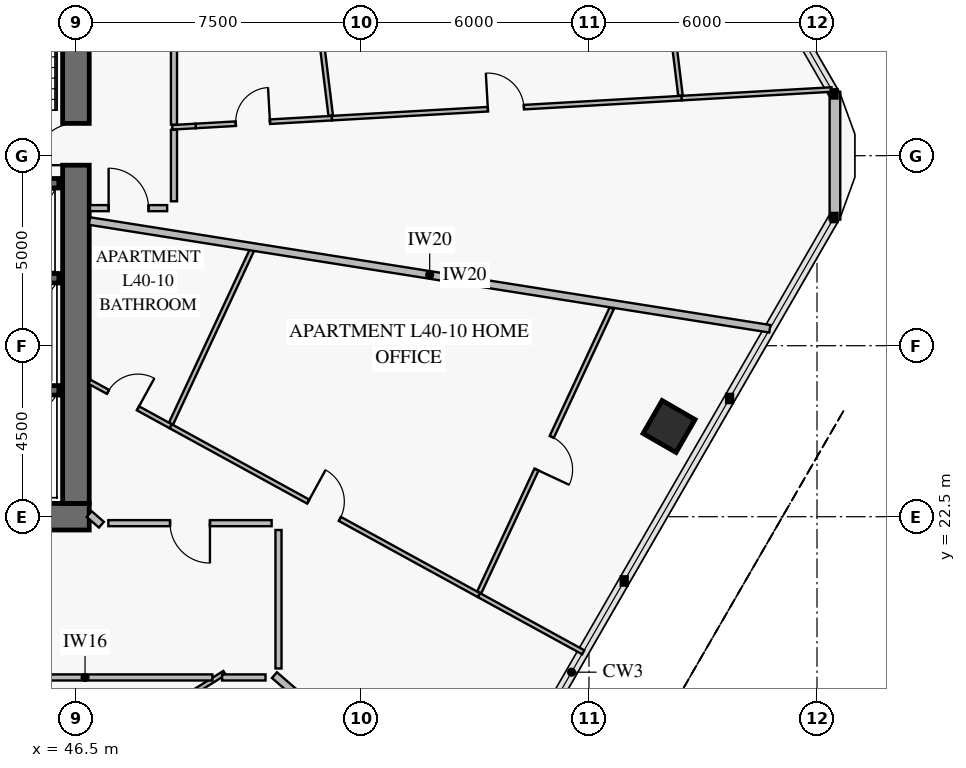
"""IFC4 building model, lengths in metres.
Left out: names, types, materials, properties, quantities, classifications, styles, units other than length and angle.
Written with IfcOpenShell. Run it as: python <this file> out.ifc"""

import sys

from ifc_helpers import new_model, si_unit, direction, frame, frame_2d, origin, origin_2d, place, context, subcontext, project, spatial, rectangle, extrude, element, fill, save


model = new_model("IFC4")
c1 = context("Model", 3, precision=1e-05, world=origin(), true_north=direction((0.0, 1.0)))
c2 = subcontext(c1, "Body", "Model", "MODEL_VIEW")
j1 = project(units=[si_unit("LENGTHUNIT", "METRE"), si_unit("PLANEANGLEUNIT", "RADIAN")], contexts=[c1])
p1 = place(None, origin())
s1 = spatial("IfcSite", under=j1, at=p1, CompositionType="ELEMENT")
p2 = place(p1, origin())
s2 = spatial("IfcBuilding", under=s1, at=p2, CompositionType="ELEMENT")
p3 = place(p2, frame((0.0, 0.0, 161.8)))
s3 = spatial("IfcBuildingStorey", under=s2, at=p3, CompositionType="ELEMENT", Elevation=161.8)
p4 = place(p3, frame((37.35, 22.5, 0.0), z_axis=(0.0, 0.0, 1.0), x_axis=(1.0, 0.0, 0.0)))
e1 = element("IfcWall", 1, at=p4, inside=s3, PredefinedType="SHEAR", context=c2, shape_type="SweptSolid", body=[
    extrude(rectangle(XDim=9.5, YDim=0.7, at=frame_2d((4.75, 0.0))), origin(), (0.0, 0.0, 1.0), 3.8),
])
p5 = place(p4, frame((3.95, 0.0, 0.0)))
e2 = element("IfcOpeningElement", 2, at=p5, cuts=e1, PredefinedType="OPENING", context=c2, shape_type="SweptSolid", body=[
    extrude(rectangle(XDim=1.5, YDim=2.15, at=frame_2d((0.75, 1.075))), frame((0.0, 0.362, 0.0), z_axis=(0.0, -1.0, 0.0), x_axis=(1.0, 0.0, 0.0)), (0.0, 0.0, 1.0), 0.724),
])
p6 = place(p3, frame((46.5, 22.85, 0.0), z_axis=(0.0, 0.0, 1.0), x_axis=(0.0, 1.0, 0.0)))
e3 = element("IfcWall", 3, at=p6, inside=s3, PredefinedType="SHEAR", context=c2, shape_type="SweptSolid", body=[
    extrude(rectangle(XDim=18.3, YDim=0.7, at=frame_2d((9.15, 0.0))), origin(), (0.0, 0.0, 1.0), 3.8),
])
p7 = place(p6, frame((8.9, 0.0, 0.0)))
e4 = element("IfcOpeningElement", 4, at=p7, cuts=e3, PredefinedType="OPENING", context=c2, shape_type="SweptSolid", body=[
    extrude(rectangle(XDim=1.1, YDim=2.15, at=frame_2d((0.55, 1.075))), frame((0.0, 0.362, 0.0), z_axis=(0.0, -1.0, 0.0), x_axis=(1.0, 0.0, 0.0)), (0.0, 0.0, 1.0), 0.724),
])
p8 = place(p3, frame((62.108, 24.874, 0.0), z_axis=(0.0, 0.0, 1.0), x_axis=(0.5, 0.866025403784, 0.0)))
e5 = element("IfcColumn", 5, at=p8, inside=s3, PredefinedType="COLUMN", context=c2, shape_type="SweptSolid", body=[
    extrude(rectangle(XDim=1.0, YDim=1.0, at=origin_2d()), origin(), (0.0, 0.0, 1.0), 3.55),
])
p9 = place(p3, frame((66.472, 33.683, 0.0), z_axis=(0.0, 0.0, 1.0), x_axis=(0.0, -1.0, 0.0)))
e6 = element("IfcWall", 6, at=p9, inside=s3, PredefinedType="SOLIDWALL", context=c2, shape_type="SweptSolid", body=[
    extrude(rectangle(XDim=3.365, YDim=0.28, at=frame_2d((1.683, 0.0))), origin(), (0.0, 0.0, 1.0), 3.55),
])
p10 = place(p3, frame((25.95, 31.275, 0.0), z_axis=(0.0, 0.0, 1.0), x_axis=(1.0, 0.0, 0.0)))
e7 = element("IfcWall", 7, at=p10, inside=s3, PredefinedType="SOLIDWALL", context=c2, shape_type="SweptSolid", body=[
    extrude(rectangle(XDim=20.1, YDim=0.25, at=frame_2d((10.05, 0.0))), origin(), (0.0, 0.0, 1.0), 3.8),
])
p11 = place(p10, frame((2.6, 0.0, 0.0)))
e8 = element("IfcOpeningElement", 8, at=p11, cuts=e7, PredefinedType="OPENING", context=c2, shape_type="SweptSolid", body=[
    extrude(rectangle(XDim=1.1, YDim=2.15, at=frame_2d((0.55, 1.075))), frame((0.0, 0.137, 0.0), z_axis=(0.0, -1.0, 0.0), x_axis=(1.0, 0.0, 0.0)), (0.0, 0.0, 1.0), 0.274),
])
p12 = place(p10, frame((10.6, 0.0, 0.0)))
e9 = element("IfcOpeningElement", 9, at=p12, cuts=e7, PredefinedType="OPENING", context=c2, shape_type="SweptSolid", body=[
    extrude(rectangle(XDim=1.1, YDim=2.15, at=frame_2d((0.55, 1.075))), frame((0.0, 0.137, 0.0), z_axis=(0.0, -1.0, 0.0), x_axis=(1.0, 0.0, 0.0)), (0.0, 0.0, 1.0), 0.274),
])
p13 = place(p10, frame((16.35, 0.0, 0.0)))
e10 = element("IfcOpeningElement", 10, at=p13, cuts=e7, PredefinedType="OPENING", context=c2, shape_type="SweptSolid", body=[
    extrude(rectangle(XDim=1.1, YDim=2.15, at=frame_2d((0.55, 1.075))), frame((0.0, 0.137, 0.0), z_axis=(0.0, -1.0, 0.0), x_axis=(1.0, 0.0, 0.0)), (0.0, 0.0, 1.0), 0.274),
])
for number, where, z_axis, x_axis in (
    (11, (43.8, 25.825, 0.0), (0.0, 0.0, 1.0), (1.0, 0.0, 0.0)),
    (12, (43.8, 28.775, 0.0), (0.0, 0.0, 1.0), (1.0, 0.0, 0.0)),
):
    element("IfcWall", number, at=place(p3, frame(where, z_axis=z_axis, x_axis=x_axis)), inside=s3, PredefinedType="SOLIDWALL", context=c2, shape_type="SweptSolid", body=[
        extrude(rectangle(XDim=2.25, YDim=0.25, at=frame_2d((1.125, 0.0))), origin(), (0.0, 0.0, 1.0), 3.8),
    ])
p14 = place(p3, frame((46.858, 26.051, 0.0), z_axis=(0.0, 0.0, 1.0), x_axis=(0.876994813325, -0.480499841209, 0.0)))
e13 = element("IfcWall", 13, at=p14, inside=s3, PredefinedType="PARTITIONING", context=c2, shape_type="SweptSolid", body=[
    extrude(rectangle(XDim=2.438, YDim=0.12, at=frame_2d((1.219, 0.0))), origin(), (0.0, 0.0, 1.0), 3.55),
])
p15 = place(p14, frame((0.552, 0.0, 0.0)))
e14 = element("IfcOpeningElement", 14, at=p15, cuts=e13, PredefinedType="OPENING", context=c2, shape_type="SweptSolid", body=[
    extrude(rectangle(XDim=0.9, YDim=2.1, at=frame_2d((0.45, 1.05))), frame((0.0, 0.072, 0.0), z_axis=(0.0, -1.0, 0.0), x_axis=(1.0, 0.0, 0.0)), (0.0, 0.0, 1.0), 0.144),
])
p16 = place(p3, frame((48.996, 24.879, 0.0), z_axis=(0.0, 0.0, 1.0), x_axis=(0.876975739836, -0.480534651965, 0.0)))
e15 = element("IfcWall", 15, at=p16, inside=s3, PredefinedType="PARTITIONING", context=c2, shape_type="SweptSolid", body=[
    extrude(rectangle(XDim=9.247, YDim=0.12, at=frame_2d((4.623, 0.0))), origin(), (0.0, 0.0, 1.0), 3.15),
])
p17 = place(p16, frame((4.123, 0.0, 0.0)))
e16 = element("IfcOpeningElement", 16, at=p17, cuts=e15, PredefinedType="OPENING", context=c2, shape_type="SweptSolid", body=[
    extrude(rectangle(XDim=0.95, YDim=2.1, at=frame_2d((0.475, 1.05))), frame((0.0, 0.072, 0.0), z_axis=(0.0, -1.0, 0.0), x_axis=(1.0, 0.0, 0.0)), (0.0, 0.0, 1.0), 0.144),
])
p18 = place(p3, frame((57.112, 20.509, 0.0), z_axis=(0.0, 0.0, 1.0), x_axis=(0.422622958653, 0.906305596815, 0.0)))
e17 = element("IfcWall", 17, at=p18, inside=s3, PredefinedType="PARTITIONING", context=c2, shape_type="SweptSolid", body=[
    extrude(rectangle(XDim=8.249, YDim=0.12, at=frame_2d((4.125, 0.0))), origin(), (0.0, 0.0, 1.0), 2.9),
])
p19 = place(p18, frame((3.565, 0.0, 0.0)))
e18 = element("IfcOpeningElement", 18, at=p19, cuts=e17, PredefinedType="OPENING", context=c2, shape_type="SweptSolid", body=[
    extrude(rectangle(XDim=0.95, YDim=2.1, at=frame_2d((0.475, 1.05))), frame((0.0, 0.072, 0.0), z_axis=(0.0, -1.0, 0.0), x_axis=(1.0, 0.0, 0.0)), (0.0, 0.0, 1.0), 0.144),
])
p20 = place(p3, frame((51.65, 22.33, 0.0), z_axis=(0.0, 0.0, 1.0), x_axis=(-1.0, 0.0, 0.0)))
e19 = element("IfcWall", 19, at=p20, inside=s3, PredefinedType="PARTITIONING", context=c2, shape_type="SweptSolid", body=[
    extrude(rectangle(XDim=4.297, YDim=0.16, at=frame_2d((2.148, 0.0))), origin(), (0.0, 0.0, 1.0), 3.55),
])
p21 = place(p20, frame((1.624, 0.0, 0.0)))
e20 = element("IfcOpeningElement", 20, at=p21, cuts=e19, PredefinedType="OPENING", context=c2, shape_type="SweptSolid", body=[
    extrude(rectangle(XDim=1.05, YDim=2.15, at=frame_2d((0.525, 1.075))), frame((0.0, 0.092, 0.0), z_axis=(0.0, -1.0, 0.0), x_axis=(1.0, 0.0, 0.0)), (0.0, 0.0, 1.0), 0.184),
])
p22 = place(p3, frame((49.65, 32.782, 0.0), z_axis=(0.0, 0.0, 1.0), x_axis=(0.998362032919, 0.057212334562, 0.0)))
e21 = element("IfcWall", 21, at=p22, inside=s3, PredefinedType="PARTITIONING", context=c2, shape_type="SweptSolid", body=[
    extrude(rectangle(XDim=3.593, YDim=0.12, at=frame_2d((1.796, 0.0))), origin(), (0.0, 0.0, 1.0), 3.55),
])
p23 = place(p22, frame((1.059, 0.0, 0.0)))
e22 = element("IfcOpeningElement", 22, at=p23, cuts=e21, PredefinedType="OPENING", context=c2, shape_type="SweptSolid", body=[
    extrude(rectangle(XDim=0.9, YDim=2.1, at=frame_2d((0.45, 1.05))), frame((0.0, 0.072, 0.0), z_axis=(0.0, -1.0, 0.0), x_axis=(1.0, 0.0, 0.0)), (0.0, 0.0, 1.0), 0.144),
])
p24 = place(p3, frame((53.237, 32.988, 0.0), z_axis=(0.0, 0.0, 1.0), x_axis=(0.998361191425, 0.057227016835, 0.0)))
e23 = element("IfcWall", 23, at=p24, inside=s3, PredefinedType="PARTITIONING", context=c2, shape_type="SweptSolid", body=[
    extrude(rectangle(XDim=9.219, YDim=0.12, at=frame_2d((4.61, 0.0))), origin(), (0.0, 0.0, 1.0), 2.87),
])
p25 = place(p24, frame((4.11, 0.0, 0.0)))
e24 = element("IfcOpeningElement", 24, at=p25, cuts=e23, PredefinedType="OPENING", context=c2, shape_type="SweptSolid", body=[
    extrude(rectangle(XDim=0.95, YDim=2.1, at=frame_2d((0.475, 1.05))), frame((0.0, 0.072, 0.0), z_axis=(0.0, -1.0, 0.0), x_axis=(1.0, 0.0, 0.0)), (0.0, 0.0, 1.0), 0.144),
])
p26 = place(p3, frame((62.408, 33.582, 0.0), z_axis=(0.0, 0.0, 1.0), x_axis=(-0.121862130173, 0.992547037288, 0.0)))
e25 = element("IfcWall", 25, at=p26, inside=s3, PredefinedType="PARTITIONING", context=c2, shape_type="SweptSolid", body=[
    extrude(rectangle(XDim=5.063, YDim=0.12, at=frame_2d((2.531, 0.0))), origin(), (0.0, 0.0, 1.0), 2.87),
])
p27 = place(p26, frame((1.972, 0.0, 0.0)))
e26 = element("IfcOpeningElement", 26, at=p27, cuts=e25, PredefinedType="OPENING", context=c2, shape_type="SweptSolid", body=[
    extrude(rectangle(XDim=0.95, YDim=2.1, at=frame_2d((0.475, 1.05))), frame((0.0, 0.072, 0.0), z_axis=(0.0, -1.0, 0.0), x_axis=(1.0, 0.0, 0.0)), (0.0, 0.0, 1.0), 0.144),
])
p28 = place(p3, frame((46.87, 30.62, 0.0), z_axis=(0.0, 0.0, 1.0), x_axis=(1.0, 0.0, 0.0)))
e27 = element("IfcWall", 27, at=p28, inside=s3, PredefinedType="PARTITIONING", context=c2, shape_type="SweptSolid", body=[
    extrude(rectangle(XDim=2.03, YDim=0.16, at=frame_2d((1.015, 0.0))), origin(), (0.0, 0.0, 1.0), 3.55),
])
p29 = place(p28, frame((0.49, 0.0, 0.0)))
e28 = element("IfcOpeningElement", 28, at=p29, cuts=e27, PredefinedType="OPENING", context=c2, shape_type="SweptSolid", body=[
    extrude(rectangle(XDim=1.05, YDim=2.15, at=frame_2d((0.525, 1.075))), frame((0.0, 0.092, 0.0), z_axis=(0.0, -1.0, 0.0), x_axis=(1.0, 0.0, 0.0)), (0.0, 0.0, 1.0), 0.184),
])
p30 = place(p3, frame((45.095, 15.069, 0.0), z_axis=(0.0, 0.0, 1.0), x_axis=(0.84804863288, 0.529918405296, 0.0)))
e29 = element("IfcWall", 29, at=p30, inside=s3, PredefinedType="PARTITIONING", context=c2, shape_type="SweptSolid", body=[
    extrude(rectangle(XDim=6.268, YDim=0.12, at=frame_2d((3.134, 0.0))), origin(), (0.0, 0.0, 1.0), 2.9),
])
p31 = place(p3, frame((46.85, 22.568, 0.0), z_axis=(0.0, 0.0, 1.0), x_axis=(0.754890568134, -0.655850768196, 0.0)))
e30 = element("IfcWall", 30, at=p31, inside=s3, PredefinedType="PARTITIONING", context=c2, shape_type="SweptSolid", body=[
    extrude(rectangle(XDim=0.424, YDim=0.2, at=frame_2d((0.212, 0.0))), origin(), (0.0, 0.0, 1.0), 3.55),
])
p32 = place(p3, frame((51.724, 18.331, 0.0), z_axis=(0.0, 0.0, 1.0), x_axis=(0.754712052901, -0.656056184489, 0.0)))
e31 = element("IfcWall", 31, at=p32, inside=s3, PredefinedType="PARTITIONING", context=c2, shape_type="SweptSolid", body=[
    extrude(rectangle(XDim=6.857, YDim=0.2, at=frame_2d((3.429, 0.0))), origin(), (0.0, 0.0, 1.0), 2.87),
])
p33 = place(p3, frame((57.105, 20.436, 0.0), z_axis=(0.0, 0.0, 1.0), x_axis=(0.876987451506, -0.480513277549, 0.0)))
e32 = element("IfcWall", 32, at=p33, inside=s3, PredefinedType="PARTITIONING", context=c2, shape_type="SweptSolid", body=[
    extrude(rectangle(XDim=3.129, YDim=0.12, at=frame_2d((1.564, 0.0))), origin(), (0.0, 0.0, 1.0), 2.87),
])
p34 = place(p3, frame((49.003, 24.953, 0.0), z_axis=(0.0, 0.0, 1.0), x_axis=(0.422601835676, 0.906315446455, 0.0)))
e33 = element("IfcWall", 33, at=p34, inside=s3, PredefinedType="PARTITIONING", context=c2, shape_type="SweptSolid", body=[
    extrude(rectangle(XDim=5.09, YDim=0.12, at=frame_2d((2.545, 0.0))), origin(), (0.0, 0.0, 1.0), 2.9),
])
p35 = place(p3, frame((46.858, 30.28, 0.0), z_axis=(0.0, 0.0, 1.0), x_axis=(0.987688144009, -0.156435706229, 0.0)))
e34 = element("IfcWall", 34, at=p35, inside=s3, PredefinedType="PARTITIONING", context=c2, shape_type="SweptSolid", body=[
    extrude(rectangle(XDim=18.124, YDim=0.2, at=frame_2d((9.062, 0.0))), origin(), (0.0, 0.0, 1.0), 2.87),
])
p36 = place(p3, frame((49.035, 32.747, 0.0), z_axis=(0.0, 0.0, 1.0), x_axis=(0.998370044223, 0.057072364576, 0.0)))
e35 = element("IfcWall", 35, at=p36, inside=s3, PredefinedType="PARTITIONING", context=c2, shape_type="SweptSolid", body=[
    extrude(rectangle(XDim=0.616, YDim=0.12, at=frame_2d((0.308, 0.0))), origin(), (0.0, 0.0, 1.0), 3.55),
])
p37 = place(p3, frame((62.441, 33.515, 0.0), z_axis=(0.0, 0.0, 1.0), x_axis=(0.998361464493, 0.057222252793, 0.0)))
e36 = element("IfcWall", 36, at=p37, inside=s3, PredefinedType="PARTITIONING", context=c2, shape_type="SweptSolid", body=[
    extrude(rectangle(XDim=3.951, YDim=0.12, at=frame_2d((1.976, 0.0))), origin(), (0.0, 0.0, 1.0), 3.55),
])
p38 = place(p3, frame((53.204, 33.054, 0.0), z_axis=(0.0, 0.0, 1.0), x_axis=(-0.121874772377, 0.992545485032, 0.0)))
e37 = element("IfcWall", 37, at=p38, inside=s3, PredefinedType="PARTITIONING", context=c2, shape_type="SweptSolid", body=[
    extrude(rectangle(XDim=5.871, YDim=0.12, at=frame_2d((2.936, 0.0))), origin(), (0.0, 0.0, 1.0), 2.9),
])
p39 = place(p3, frame((43.39, 18.27, 0.0), z_axis=(0.0, 0.0, 1.0), x_axis=(1.0, 0.0, 0.0)))
e38 = element("IfcWall", 38, at=p39, inside=s3, PredefinedType="PARTITIONING", context=c2, shape_type="SweptSolid", body=[
    extrude(rectangle(XDim=6.7, YDim=0.16, at=frame_2d((3.35, 0.0))), origin(), (0.0, 0.0, 1.0), 2.9),
])
p40 = place(p3, frame((50.346, 18.27, 0.0), z_axis=(0.0, 0.0, 1.0), x_axis=(1.0, 0.0, 0.0)))
e39 = element("IfcWall", 39, at=p40, inside=s3, PredefinedType="PARTITIONING", context=c2, shape_type="SweptSolid", body=[
    extrude(rectangle(XDim=1.142, YDim=0.16, at=frame_2d((0.571, 0.0))), origin(), (0.0, 0.0, 1.0), 3.15),
])
p41 = place(p3, frame((51.83, 18.506, 0.0), z_axis=(0.0, 0.0, 1.0), x_axis=(0.0, 1.0, 0.0)))
e40 = element("IfcWall", 40, at=p41, inside=s3, PredefinedType="PARTITIONING", context=c2, shape_type="SweptSolid", body=[
    extrude(rectangle(XDim=3.644, YDim=0.16, at=frame_2d((1.822, 0.0))), origin(), (0.0, 0.0, 1.0), 3.15),
])
p42 = place(p3, frame((49.08, 30.8, 0.0), z_axis=(0.0, 0.0, 1.0), x_axis=(0.0, 1.0, 0.0)))
e41 = element("IfcWall", 41, at=p42, inside=s3, PredefinedType="PARTITIONING", context=c2, shape_type="SweptSolid", body=[
    extrude(rectangle(XDim=1.881, YDim=0.16, at=frame_2d((0.941, 0.0))), origin(), (0.0, 0.0, 1.0), 3.55),
])
p43 = place(p3, frame((49.08, 32.818, 0.0), z_axis=(0.0, 0.0, 1.0), x_axis=(0.0, 1.0, 0.0)))
e42 = element("IfcWall", 42, at=p43, inside=s3, PredefinedType="PARTITIONING", context=c2, shape_type="SweptSolid", body=[
    extrude(rectangle(XDim=4.579, YDim=0.16, at=frame_2d((2.289, 0.0))), origin(), (0.0, 0.0, 1.0), 2.9),
])
p44 = place(p7, origin())
e43 = element("IfcDoor", 43, at=p44, inside=s3, OperationType="SINGLE_SWING_LEFT", PredefinedType="USERDEFINED", context=c2, shape_type="SweptSolid", body=[
    extrude(rectangle(XDim=1.1, YDim=2.15, at=frame_2d((0.55, 1.075))), frame((0.0, 0.025, 0.0), z_axis=(0.0, -1.0, 0.0), x_axis=(1.0, 0.0, 0.0)), (0.0, 0.0, 1.0), 0.05),
])
fill(e4, e43)
p45 = place(p15, origin())
e44 = element("IfcDoor", 44, at=p45, inside=s3, OperationType="SINGLE_SWING_RIGHT", PredefinedType="DOOR", context=c2, shape_type="SweptSolid", body=[
    extrude(rectangle(XDim=0.9, YDim=2.1, at=frame_2d((0.45, 1.05))), frame((0.0, 0.025, 0.0), z_axis=(0.0, -1.0, 0.0), x_axis=(1.0, 0.0, 0.0)), (0.0, 0.0, 1.0), 0.05),
])
fill(e14, e44)
p46 = place(p17, origin())
e45 = element("IfcDoor", 45, at=p46, inside=s3, OperationType="SINGLE_SWING_LEFT", PredefinedType="DOOR", context=c2, shape_type="SweptSolid", body=[
    extrude(rectangle(XDim=0.95, YDim=2.1, at=frame_2d((0.475, 1.05))), frame((0.0, 0.025, 0.0), z_axis=(0.0, -1.0, 0.0), x_axis=(1.0, 0.0, 0.0)), (0.0, 0.0, 1.0), 0.05),
])
fill(e16, e45)
p47 = place(p19, frame((0.95, 0.0, 0.0), z_axis=(0.0, 0.0, 1.0), x_axis=(-1.0, 0.0, 0.0)))
e46 = element("IfcDoor", 46, at=p47, inside=s3, OperationType="SINGLE_SWING_RIGHT", PredefinedType="DOOR", context=c2, shape_type="SweptSolid", body=[
    extrude(rectangle(XDim=0.95, YDim=2.1, at=frame_2d((0.475, 1.05))), frame((0.0, 0.025, 0.0), z_axis=(0.0, -1.0, 0.0), x_axis=(1.0, 0.0, 0.0)), (0.0, 0.0, 1.0), 0.05),
])
fill(e18, e46)
p48 = place(p21, origin())
e47 = element("IfcDoor", 47, at=p48, inside=s3, OperationType="SINGLE_SWING_LEFT", PredefinedType="DOOR", context=c2, shape_type="SweptSolid", body=[
    extrude(rectangle(XDim=1.05, YDim=2.15, at=frame_2d((0.525, 1.075))), frame((0.0, 0.025, 0.0), z_axis=(0.0, -1.0, 0.0), x_axis=(1.0, 0.0, 0.0)), (0.0, 0.0, 1.0), 0.05),
])
fill(e20, e47)
p49 = place(p23, origin())
e48 = element("IfcDoor", 48, at=p49, inside=s3, OperationType="SINGLE_SWING_RIGHT", PredefinedType="DOOR", context=c2, shape_type="SweptSolid", body=[
    extrude(rectangle(XDim=0.9, YDim=2.1, at=frame_2d((0.45, 1.05))), frame((0.0, 0.025, 0.0), z_axis=(0.0, -1.0, 0.0), x_axis=(1.0, 0.0, 0.0)), (0.0, 0.0, 1.0), 0.05),
])
fill(e22, e48)
p50 = place(p25, origin())
e49 = element("IfcDoor", 49, at=p50, inside=s3, OperationType="SINGLE_SWING_LEFT", PredefinedType="DOOR", context=c2, shape_type="SweptSolid", body=[
    extrude(rectangle(XDim=0.95, YDim=2.1, at=frame_2d((0.475, 1.05))), frame((0.0, 0.025, 0.0), z_axis=(0.0, -1.0, 0.0), x_axis=(1.0, 0.0, 0.0)), (0.0, 0.0, 1.0), 0.05),
])
fill(e24, e49)
p51 = place(p29, origin())
e50 = element("IfcDoor", 50, at=p51, inside=s3, OperationType="SINGLE_SWING_LEFT", PredefinedType="DOOR", context=c2, shape_type="SweptSolid", body=[
    extrude(rectangle(XDim=1.05, YDim=2.15, at=frame_2d((0.525, 1.075))), frame((0.0, 0.025, 0.0), z_axis=(0.0, -1.0, 0.0), x_axis=(1.0, 0.0, 0.0)), (0.0, 0.0, 1.0), 0.05),
])
fill(e28, e50)
save(model, sys.argv[1])
